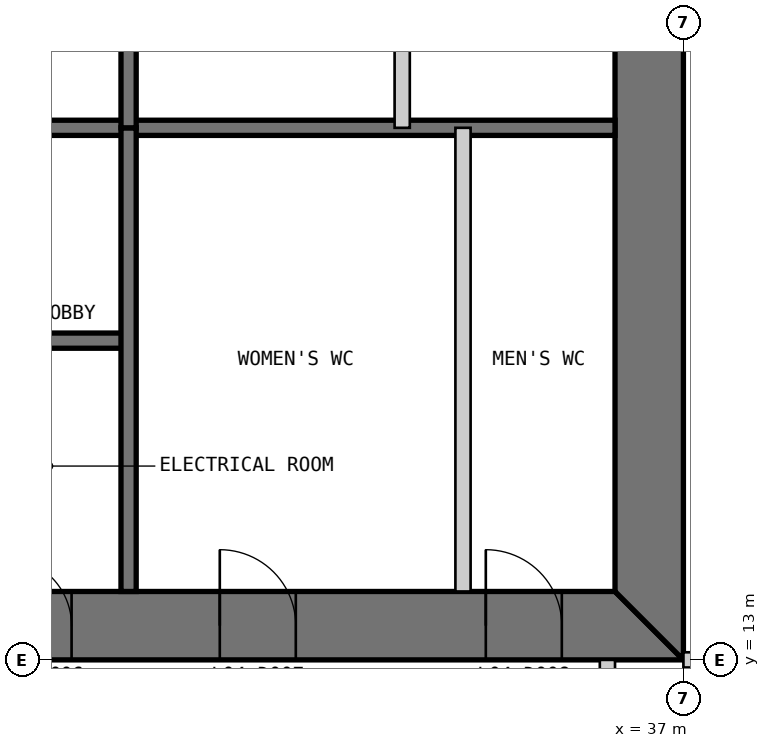
"""IFC4 building model, lengths in metres.
Left out: names, types, materials, properties, quantities, classifications, styles, units other than length and angle.
Written with IfcOpenShell. Run it as: python <this file> out.ifc"""

import sys

from ifc_helpers import new_model, si_unit, direction, frame, frame_2d, origin, place, context, subcontext, project, spatial, polyline, rectangle, outline, extrude, element, fill, save


model = new_model("IFC4")
c1 = context("Model", 3, precision=1e-05, world=origin(), true_north=direction((0.0, 1.0)))
c2 = subcontext(c1, "Body", "Model", "MODEL_VIEW")
j1 = project(units=[si_unit("LENGTHUNIT", "METRE"), si_unit("PLANEANGLEUNIT", "RADIAN")], contexts=[c1])
p1 = place(None, origin())
s1 = spatial("IfcSite", under=j1, at=p1, CompositionType="ELEMENT")
p2 = place(p1, origin())
s2 = spatial("IfcBuilding", under=s1, at=p2, CompositionType="ELEMENT")
p3 = place(p2, frame((0.0, 0.0, 21.4)))
s3 = spatial("IfcBuildingStorey", under=s2, at=p3, CompositionType="ELEMENT", Elevation=21.4)
p4 = place(p3, frame((13.0, 13.45, 0.0), z_axis=(0.0, 0.0, 1.0), x_axis=(1.0, 0.0, 0.0)))
e1 = element("IfcWall", 1, at=p4, inside=s3, PredefinedType="SHEAR", context=c2, shape_type="SweptSolid", body=[
    extrude(outline(polyline([(0.0, -0.45), (24.0, -0.45), (23.1, 0.45), (0.9, 0.45), (0.0, -0.45)])), origin(), (0.0, 0.0, 1.0), 4.8),
])
p5 = place(p4, frame((4.9, 0.0, 0.0)))
e2 = element("IfcOpeningElement", 2, at=p5, cuts=e1, PredefinedType="OPENING", context=c2, shape_type="SweptSolid", body=[
    extrude(rectangle(XDim=1.0, YDim=2.2, at=frame_2d((0.5, 1.1))), frame((0.0, 0.46, 0.0), z_axis=(0.0, -1.0, 0.0), x_axis=(1.0, 0.0, 0.0)), (0.0, 0.0, 1.0), 0.92),
])
p6 = place(p4, frame((8.9, 0.0, 0.0)))
e3 = element("IfcOpeningElement", 3, at=p6, cuts=e1, PredefinedType="OPENING", context=c2, shape_type="SweptSolid", body=[
    extrude(rectangle(XDim=1.1, YDim=2.2, at=frame_2d((0.55, 1.1))), frame((0.0, 0.46, 0.0), z_axis=(0.0, -1.0, 0.0), x_axis=(1.0, 0.0, 0.0)), (0.0, 0.0, 1.0), 0.92),
])
p7 = place(p4, frame((15.05, 0.0, 0.0)))
e4 = element("IfcOpeningElement", 4, at=p7, cuts=e1, PredefinedType="OPENING", context=c2, shape_type="SweptSolid", body=[
    extrude(rectangle(XDim=0.9, YDim=2.2, at=frame_2d((0.45, 1.1))), frame((0.0, 0.46, 0.0), z_axis=(0.0, -1.0, 0.0), x_axis=(1.0, 0.0, 0.0)), (0.0, 0.0, 1.0), 0.92),
])
p8 = place(p4, frame((17.9, 0.0, 0.0)))
e5 = element("IfcOpeningElement", 5, at=p8, cuts=e1, PredefinedType="OPENING", context=c2, shape_type="SweptSolid", body=[
    extrude(rectangle(XDim=1.0, YDim=2.2, at=frame_2d((0.5, 1.1))), frame((0.0, 0.46, 0.0), z_axis=(0.0, -1.0, 0.0), x_axis=(1.0, 0.0, 0.0)), (0.0, 0.0, 1.0), 0.92),
])
p9 = place(p4, frame((21.4, 0.0, 0.0)))
e6 = element("IfcOpeningElement", 6, at=p9, cuts=e1, PredefinedType="OPENING", context=c2, shape_type="SweptSolid", body=[
    extrude(rectangle(XDim=1.0, YDim=2.2, at=frame_2d((0.5, 1.1))), frame((0.0, 0.46, 0.0), z_axis=(0.0, -1.0, 0.0), x_axis=(1.0, 0.0, 0.0)), (0.0, 0.0, 1.0), 0.92),
])
p10 = place(p3, frame((36.55, 13.9, 0.0), z_axis=(0.0, 0.0, 1.0), x_axis=(0.0, 1.0, 0.0)))
e7 = element("IfcWall", 7, at=p10, inside=s3, PredefinedType="SHEAR", context=c2, shape_type="SweptSolid", body=[
    extrude(outline(polyline([(-0.9, -0.45), (23.1, -0.45), (22.2, 0.45), (0.0, 0.45), (-0.9, -0.45)])), origin(), (0.0, 0.0, 1.0), 4.8),
])
p11 = place(p10, frame((20.2, 0.0, 0.0)))
e8 = element("IfcOpeningElement", 8, at=p11, cuts=e7, PredefinedType="OPENING", context=c2, shape_type="SweptSolid", body=[
    extrude(rectangle(XDim=1.0, YDim=2.2, at=frame_2d((0.5, 1.1))), frame((0.0, 0.46, 0.0), z_axis=(0.0, -1.0, 0.0), x_axis=(1.0, 0.0, 0.0)), (0.0, 0.0, 1.0), 0.92),
])
p12 = place(p10, frame((17.25, 0.0, 0.0)))
e9 = element("IfcOpeningElement", 9, at=p12, cuts=e7, PredefinedType="OPENING", context=c2, shape_type="SweptSolid", body=[
    extrude(rectangle(XDim=0.9, YDim=2.2, at=frame_2d((0.45, 1.1))), frame((0.0, 0.46, 0.0), z_axis=(0.0, -1.0, 0.0), x_axis=(1.0, 0.0, 0.0)), (0.0, 0.0, 1.0), 0.92),
])
p13 = place(p3, frame((20.3, 17.2, 0.0), z_axis=(0.0, 0.0, 1.0), x_axis=(1.0, 0.0, 0.0)))
e10 = element("IfcWall", 10, at=p13, inside=s3, PredefinedType="SOLIDWALL", context=c2, shape_type="SweptSolid", body=[
    extrude(rectangle(XDim=9.4, YDim=0.2, at=frame_2d((4.7, 0.0))), origin(), (0.0, 0.0, 1.0), 4.6),
])
p14 = place(p13, frame((0.25, 0.0, 0.0)))
e11 = element("IfcOpeningElement", 11, at=p14, cuts=e10, PredefinedType="OPENING", context=c2, shape_type="SweptSolid", body=[
    extrude(rectangle(XDim=1.0, YDim=2.2, at=frame_2d((0.5, 1.1))), frame((0.0, 0.11, 0.0), z_axis=(0.0, -1.0, 0.0), x_axis=(1.0, 0.0, 0.0)), (0.0, 0.0, 1.0), 0.22),
])
p15 = place(p3, frame((20.3, 20.0, 0.0), z_axis=(0.0, 0.0, 1.0), x_axis=(1.0, 0.0, 0.0)))
e12 = element("IfcWall", 12, at=p15, inside=s3, PredefinedType="SOLIDWALL", context=c2, shape_type="SweptSolid", body=[
    extrude(rectangle(XDim=15.8, YDim=0.2, at=frame_2d((7.9, 0.0))), origin(), (0.0, 0.0, 1.0), 4.6),
])
p16 = place(p3, frame((29.7, 13.9, 0.0), z_axis=(0.0, 0.0, 1.0), x_axis=(0.0, 1.0, 0.0)))
e13 = element("IfcWall", 13, at=p16, inside=s3, PredefinedType="SOLIDWALL", context=c2, shape_type="SweptSolid", body=[
    extrude(rectangle(XDim=6.1, YDim=0.2, at=frame_2d((3.05, 0.0))), origin(), (0.0, 0.0, 1.0), 4.6),
])
p17 = place(p3, frame((34.1, 13.9, 0.0), z_axis=(0.0, 0.0, 1.0), x_axis=(0.0, 1.0, 0.0)))
e14 = element("IfcWall", 14, at=p17, inside=s3, PredefinedType="PARTITIONING", context=c2, shape_type="SweptSolid", body=[
    extrude(rectangle(XDim=6.1, YDim=0.2, at=frame_2d((3.05, 0.0))), origin(), (0.0, 0.0, 1.0), 4.6),
])
p18 = place(p3, frame((33.3, 36.1, 0.0), z_axis=(0.0, 0.0, 1.0), x_axis=(0.0, -1.0, 0.0)))
e15 = element("IfcWall", 15, at=p18, inside=s3, PredefinedType="PARTITIONING", context=c2, shape_type="SweptSolid", body=[
    extrude(rectangle(XDim=16.1, YDim=0.2, at=frame_2d((8.05, 0.0))), origin(), (0.0, 0.0, 1.0), 4.6),
])
p19 = place(p3, frame((29.7, 36.1, 0.0), z_axis=(0.0, 0.0, 1.0), x_axis=(0.0, -1.0, 0.0)))
e16 = element("IfcWall", 16, at=p19, inside=s3, PredefinedType="SOLIDWALL", context=c2, shape_type="SweptSolid", body=[
    extrude(rectangle(XDim=16.1, YDim=0.2, at=frame_2d((8.05, 0.0))), origin(), (0.0, 0.0, 1.0), 4.6),
])
p20 = place(p3, frame((36.0, 7.0, 0.0), z_axis=(0.0, 0.0, 1.0), x_axis=(0.0, 1.0, 0.0)))
e17 = element("IfcWall", 17, at=p20, inside=s3, PredefinedType="PARTITIONING", context=c2, shape_type="SweptSolid", body=[
    extrude(rectangle(XDim=6.0, YDim=0.2, at=frame_2d((3.0, 0.0))), origin(), (0.0, 0.0, 1.0), 4.5),
])
p21 = place(p20, frame((3.3, 0.0, 0.0)))
e18 = element("IfcOpeningElement", 18, at=p21, cuts=e17, PredefinedType="OPENING", context=c2, shape_type="SweptSolid", body=[
    extrude(rectangle(XDim=0.9, YDim=2.2, at=frame_2d((0.45, 1.1))), frame((0.0, 0.11, 0.0), z_axis=(0.0, -1.0, 0.0), x_axis=(1.0, 0.0, 0.0)), (0.0, 0.0, 1.0), 0.22),
])
p22 = place(p3, frame((37.0, 13.0, 0.0), z_axis=(0.0, 0.0, 1.0), x_axis=(1.0, 0.0, 0.0)))
e19 = element("IfcWall", 19, at=p22, inside=s3, PredefinedType="PARTITIONING", context=c2, shape_type="SweptSolid", body=[
    extrude(rectangle(XDim=6.0, YDim=0.2, at=frame_2d((3.0, 0.0))), origin(), (0.0, 0.0, 1.0), 3.653),
])
p23 = place(p7, origin())
e20 = element("IfcDoor", 20, at=p23, inside=s3, OperationType="SINGLE_SWING_LEFT", PredefinedType="DOOR", context=c2, shape_type="SweptSolid", body=[
    extrude(rectangle(XDim=0.9, YDim=2.2, at=frame_2d((0.45, 1.1))), frame((0.0, 0.025, 0.0), z_axis=(0.0, -1.0, 0.0), x_axis=(1.0, 0.0, 0.0)), (0.0, 0.0, 1.0), 0.05),
    extrude(outline(polyline([(0.0, 0.0), (0.04, 0.0), (0.04, 2.16), (0.86, 2.16), (0.86, 0.0), (0.9, 0.0), (0.9, 2.2), (0.0, 2.2), (0.0, 0.0)])), frame((0.0, 0.3, 0.0), z_axis=(0.0, -1.0, 0.0), x_axis=(1.0, 0.0, 0.0)), (0.0, 0.0, 1.0), 0.6),
])
fill(e4, e20)
p24 = place(p8, origin())
e21 = element("IfcDoor", 21, at=p24, inside=s3, OperationType="SINGLE_SWING_LEFT", PredefinedType="DOOR", context=c2, shape_type="SweptSolid", body=[
    extrude(rectangle(XDim=1.0, YDim=2.2, at=frame_2d((0.5, 1.1))), frame((0.0, 0.025, 0.0), z_axis=(0.0, -1.0, 0.0), x_axis=(1.0, 0.0, 0.0)), (0.0, 0.0, 1.0), 0.05),
    extrude(outline(polyline([(0.0, 0.0), (0.04, 0.0), (0.04, 2.16), (0.96, 2.16), (0.96, 0.0), (1.0, 0.0), (1.0, 2.2), (0.0, 2.2), (0.0, 0.0)])), frame((0.0, 0.3, 0.0), z_axis=(0.0, -1.0, 0.0), x_axis=(1.0, 0.0, 0.0)), (0.0, 0.0, 1.0), 0.6),
])
fill(e5, e21)
p25 = place(p9, origin())
e22 = element("IfcDoor", 22, at=p25, inside=s3, OperationType="SINGLE_SWING_LEFT", PredefinedType="DOOR", context=c2, shape_type="SweptSolid", body=[
    extrude(rectangle(XDim=1.0, YDim=2.2, at=frame_2d((0.5, 1.1))), frame((0.0, 0.025, 0.0), z_axis=(0.0, -1.0, 0.0), x_axis=(1.0, 0.0, 0.0)), (0.0, 0.0, 1.0), 0.05),
    extrude(outline(polyline([(0.0, 0.0), (0.04, 0.0), (0.04, 2.16), (0.96, 2.16), (0.96, 0.0), (1.0, 0.0), (1.0, 2.2), (0.0, 2.2), (0.0, 0.0)])), frame((0.0, 0.3, 0.0), z_axis=(0.0, -1.0, 0.0), x_axis=(1.0, 0.0, 0.0)), (0.0, 0.0, 1.0), 0.6),
])
fill(e6, e22)
save(model, sys.argv[1])
